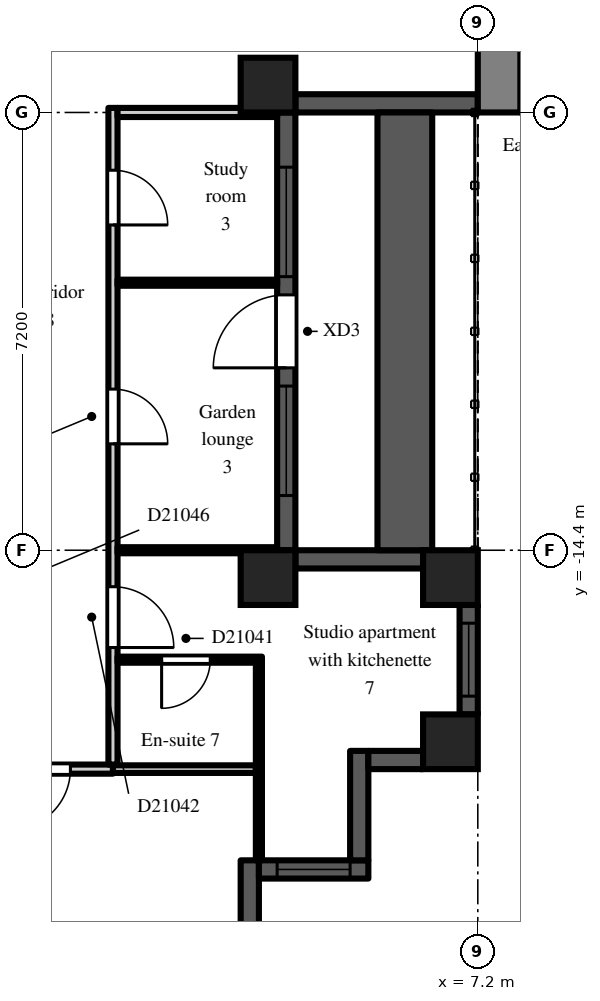
"""IFC4 building model, lengths in metres.
Left out: names, types, materials, properties, quantities, classifications, styles, units other than length and angle.
Written with IfcOpenShell. Run it as: python <this file> out.ifc"""

import sys

from ifc_helpers import new_model, si_unit, direction, frame, frame_2d, origin, origin_2d, place, context, subcontext, project, spatial, rectangle, extrude, element, fill, save


model = new_model("IFC4")
c1 = context("Model", 3, precision=1e-05, world=origin(), true_north=direction((0.0, 1.0)))
c2 = subcontext(c1, "Body", "Model", "MODEL_VIEW")
j1 = project(units=[si_unit("LENGTHUNIT", "METRE"), si_unit("PLANEANGLEUNIT", "RADIAN")], contexts=[c1])
p1 = place(None, origin())
s1 = spatial("IfcSite", under=j1, at=p1, CompositionType="ELEMENT")
p2 = place(p1, origin())
s2 = spatial("IfcBuilding", under=s1, at=p2, CompositionType="ELEMENT")
p3 = place(p2, frame((0.0, 0.0, 147.3)))
s3 = spatial("IfcBuildingStorey", under=s2, at=p3, CompositionType="ELEMENT", Elevation=147.3)
for number, where, z_axis, x_axis in (
    (1, (3.75, -14.85, 0.0), (0.0, 0.0, 1.0), (1.0, 0.0, 0.0)),
    (2, (3.75, -6.75, 0.0), (0.0, 0.0, 1.0), (1.0, 0.0, 0.0)),
    (3, (6.75, -17.55, 0.0), (0.0, 0.0, 1.0), (1.0, 0.0, 0.0)),
    (4, (6.75, -14.85, 0.0), (0.0, 0.0, 1.0), (1.0, 0.0, 0.0)),
):
    element("IfcColumn", number, at=place(p3, frame(where, z_axis=z_axis, x_axis=x_axis)), inside=s3, PredefinedType="COLUMN", context=c2, shape_type="SweptSolid", body=[
        extrude(rectangle(XDim=0.9, YDim=0.9, at=origin_2d()), origin(), (0.0, 0.0, 1.0), 3.0),
    ])
p4 = place(p3, frame((3.45, -20.7, 0.0), z_axis=(0.0, 0.0, 1.0), x_axis=(0.0, 1.0, 0.0)))
e5 = element("IfcWall", 5, at=p4, inside=s3, PredefinedType="SOLIDWALL", context=c2, shape_type="SweptSolid", body=[
    extrude(rectangle(XDim=1.2, YDim=0.3, at=frame_2d((0.6, 0.0))), origin(), (0.0, 0.0, 1.0), 2.6),
])
p5 = place(p3, frame((3.6, -19.65, 0.0), z_axis=(0.0, 0.0, 1.0), x_axis=(1.0, 0.0, 0.0)))
e6 = element("IfcWall", 6, at=p5, inside=s3, PredefinedType="SOLIDWALL", context=c2, shape_type="SweptSolid", body=[
    extrude(rectangle(XDim=1.8, YDim=0.3, at=frame_2d((0.9, 0.0))), origin(), (0.0, 0.0, 1.0), 2.6),
])
p6 = place(p5, frame((0.3, 0.0, 0.2)))
e7 = element("IfcOpeningElement", 7, at=p6, cuts=e6, PredefinedType="OPENING", context=c2, shape_type="SweptSolid", body=[
    extrude(rectangle(XDim=1.2, YDim=1.85, at=frame_2d((0.6, 0.925))), frame((0.0, 0.16, 0.0), z_axis=(0.0, -1.0, 0.0), x_axis=(1.0, 0.0, 0.0)), (0.0, 0.0, 1.0), 0.32),
])
p7 = place(p3, frame((5.25, -19.5, 0.0), z_axis=(0.0, 0.0, 1.0), x_axis=(0.0, 1.0, 0.0)))
e8 = element("IfcWall", 8, at=p7, inside=s3, PredefinedType="SOLIDWALL", context=c2, shape_type="SweptSolid", body=[
    extrude(rectangle(XDim=1.8, YDim=0.3, at=frame_2d((0.9, 0.0))), origin(), (0.0, 0.0, 1.0), 2.6),
])
p8 = place(p3, frame((5.4, -17.85, 0.0), z_axis=(0.0, 0.0, 1.0), x_axis=(1.0, 0.0, 0.0)))
e9 = element("IfcWall", 9, at=p8, inside=s3, PredefinedType="SOLIDWALL", context=c2, shape_type="SweptSolid", body=[
    extrude(rectangle(XDim=0.9, YDim=0.3, at=frame_2d((0.45, 0.0))), origin(), (0.0, 0.0, 1.0), 2.6),
])
p9 = place(p3, frame((7.05, -17.1, 0.0), z_axis=(0.0, 0.0, 1.0), x_axis=(0.0, 1.0, 0.0)))
e10 = element("IfcWall", 10, at=p9, inside=s3, PredefinedType="SOLIDWALL", context=c2, shape_type="SweptSolid", body=[
    extrude(rectangle(XDim=1.8, YDim=0.3, at=frame_2d((0.9, 0.0))), origin(), (0.0, 0.0, 1.0), 2.2),
])
p10 = place(p9, frame((0.3, 0.0, 0.2)))
e11 = element("IfcOpeningElement", 11, at=p10, cuts=e10, PredefinedType="OPENING", context=c2, shape_type="SweptSolid", body=[
    extrude(rectangle(XDim=1.2, YDim=1.85, at=frame_2d((0.6, 0.925))), frame((0.0, 0.16, 0.0), z_axis=(0.0, -1.0, 0.0), x_axis=(1.0, 0.0, 0.0)), (0.0, 0.0, 1.0), 0.32),
])
p11 = place(p3, frame((6.3, -14.55, 0.0), z_axis=(0.0, 0.0, 1.0), x_axis=(-1.0, 0.0, 0.0)))
e12 = element("IfcWall", 12, at=p11, inside=s3, PredefinedType="SOLIDWALL", context=c2, shape_type="SweptSolid", body=[
    extrude(rectangle(XDim=2.1, YDim=0.3, at=frame_2d((1.05, 0.0))), origin(), (0.0, 0.0, 1.0), 2.2),
])
p12 = place(p3, frame((4.05, -14.4, 0.0), z_axis=(0.0, 0.0, 1.0), x_axis=(0.0, 1.0, 0.0)))
e13 = element("IfcWall", 13, at=p12, inside=s3, PredefinedType="SOLIDWALL", context=c2, shape_type="SweptSolid", body=[
    extrude(rectangle(XDim=7.2, YDim=0.3, at=frame_2d((3.6, 0.0))), origin(), (0.0, 0.0, 1.0), 2.2),
])
p13 = place(p12, frame((3.0, 0.0, 0.0)))
e14 = element("IfcOpeningElement", 14, at=p13, cuts=e13, PredefinedType="OPENING", context=c2, shape_type="SweptSolid", body=[
    extrude(rectangle(XDim=1.2, YDim=2.05, at=frame_2d((0.6, 1.025))), frame((0.0, 0.16, 0.0), z_axis=(0.0, -1.0, 0.0), x_axis=(1.0, 0.0, 0.0)), (0.0, 0.0, 1.0), 0.32),
])
p14 = place(p12, frame((0.9, 0.0, 0.2)))
e15 = element("IfcOpeningElement", 15, at=p14, cuts=e13, PredefinedType="OPENING", context=c2, shape_type="SweptSolid", body=[
    extrude(rectangle(XDim=1.8, YDim=1.85, at=frame_2d((0.9, 0.925))), frame((0.0, 0.16, 0.0), z_axis=(0.0, -1.0, 0.0), x_axis=(1.0, 0.0, 0.0)), (0.0, 0.0, 1.0), 0.32),
])
p15 = place(p12, frame((4.5, 0.0, 0.2)))
e16 = element("IfcOpeningElement", 16, at=p15, cuts=e13, PredefinedType="OPENING", context=c2, shape_type="SweptSolid", body=[
    extrude(rectangle(XDim=1.8, YDim=1.85, at=frame_2d((0.9, 0.925))), frame((0.0, 0.16, 0.0), z_axis=(0.0, -1.0, 0.0), x_axis=(1.0, 0.0, 0.0)), (0.0, 0.0, 1.0), 0.32),
])
p16 = place(p3, frame((4.2, -7.05, 0.0), z_axis=(0.0, 0.0, 1.0), x_axis=(1.0, 0.0, 0.0)))
e17 = element("IfcWall", 17, at=p16, inside=s3, PredefinedType="SOLIDWALL", context=c2, shape_type="SweptSolid", body=[
    extrude(rectangle(XDim=3.0, YDim=0.3, at=frame_2d((1.5, 0.0))), origin(), (0.0, 0.0, 1.0), 2.2),
])
p17 = place(p3, frame((6.0, -14.4, 0.0), z_axis=(0.0, 0.0, 1.0), x_axis=(0.0, 1.0, 0.0)))
e18 = element("IfcWall", 18, at=p17, inside=s3, PredefinedType="PARAPET", context=c2, shape_type="SweptSolid", body=[
    extrude(rectangle(XDim=7.2, YDim=0.9, at=frame_2d((3.6, 0.0))), origin(), (0.0, 0.0, 1.0), 0.8),
])
p18 = place(p3, frame((7.55, -7.2, 0.0), z_axis=(0.0, 0.0, 1.0), x_axis=(0.0, 1.0, 0.0)))
e19 = element("IfcWall", 19, at=p18, inside=s3, PredefinedType="SHEAR", context=c2, shape_type="SweptSolid", body=[
    extrude(rectangle(XDim=14.4, YDim=0.7, at=frame_2d((7.2, 0.0))), origin(), (0.0, 0.0, 1.0), 2.6),
])
p19 = place(p18, frame((6.0, 0.0, 0.0)))
e20 = element("IfcOpeningElement", 20, at=p19, cuts=e19, PredefinedType="OPENING", context=c2, shape_type="SweptSolid", body=[
    extrude(rectangle(XDim=2.4, YDim=2.2, at=frame_2d((1.2, 1.1))), frame((0.0, 0.36, 0.0), z_axis=(0.0, -1.0, 0.0), x_axis=(1.0, 0.0, 0.0)), (0.0, 0.0, 1.0), 0.72),
])
p20 = place(p3, frame((-1.2, -18.0, 0.0), z_axis=(0.0, 0.0, 1.0), x_axis=(1.0, 0.0, 0.0)))
e21 = element("IfcWall", 21, at=p20, inside=s3, PredefinedType="PARTITIONING", context=c2, shape_type="SweptSolid", body=[
    extrude(rectangle(XDim=2.4, YDim=0.15, at=frame_2d((1.2, 0.0))), origin(), (0.0, 0.0, 1.0), 2.6),
])
p21 = place(p20, frame((0.7, 0.0, 0.0)))
e22 = element("IfcOpeningElement", 22, at=p21, cuts=e21, PredefinedType="OPENING", context=c2, shape_type="SweptSolid", body=[
    extrude(rectangle(XDim=1.0, YDim=2.1, at=frame_2d((0.5, 1.05))), frame((0.0, 0.085, 0.0), z_axis=(0.0, -1.0, 0.0), x_axis=(1.0, 0.0, 0.0)), (0.0, 0.0, 1.0), 0.17),
])
p22 = place(p3, frame((1.2, -17.925, 0.0), z_axis=(0.0, 0.0, 1.0), x_axis=(0.0, 1.0, 0.0)))
e23 = element("IfcWall", 23, at=p22, inside=s3, PredefinedType="PARTITIONING", context=c2, shape_type="SweptSolid", body=[
    extrude(rectangle(XDim=10.8, YDim=0.15, at=frame_2d((5.4, 0.0))), origin(), (0.0, 0.0, 1.0), 2.6),
])
p23 = place(p22, frame((8.875, 0.0, 0.0)))
e24 = element("IfcOpeningElement", 24, at=p23, cuts=e23, PredefinedType="OPENING", context=c2, shape_type="SweptSolid", body=[
    extrude(rectangle(XDim=0.9, YDim=2.1, at=frame_2d((0.45, 1.05))), frame((0.0, 0.085, 0.0), z_axis=(0.0, -1.0, 0.0), x_axis=(1.0, 0.0, 0.0)), (0.0, 0.0, 1.0), 0.17),
])
p24 = place(p22, frame((5.275, 0.0, 0.0)))
e25 = element("IfcOpeningElement", 25, at=p24, cuts=e23, PredefinedType="OPENING", context=c2, shape_type="SweptSolid", body=[
    extrude(rectangle(XDim=0.9, YDim=2.1, at=frame_2d((0.45, 1.05))), frame((0.0, 0.085, 0.0), z_axis=(0.0, -1.0, 0.0), x_axis=(1.0, 0.0, 0.0)), (0.0, 0.0, 1.0), 0.17),
])
p25 = place(p22, frame((1.925, 0.0, 0.0)))
e26 = element("IfcOpeningElement", 26, at=p25, cuts=e23, PredefinedType="OPENING", context=c2, shape_type="SweptSolid", body=[
    extrude(rectangle(XDim=1.0, YDim=2.1, at=frame_2d((0.5, 1.05))), frame((0.0, 0.085, 0.0), z_axis=(0.0, -1.0, 0.0), x_axis=(1.0, 0.0, 0.0)), (0.0, 0.0, 1.0), 0.17),
])
p26 = place(p3, frame((1.2, -18.0, 0.0), z_axis=(0.0, 0.0, 1.0), x_axis=(1.0, 0.0, 0.0)))
e27 = element("IfcWall", 27, at=p26, inside=s3, PredefinedType="PARTITIONING", context=c2, shape_type="SweptSolid", body=[
    extrude(rectangle(XDim=2.35, YDim=0.125, at=frame_2d((1.175, 0.0))), origin(), (0.0, 0.0, 1.0), 2.6),
])
p27 = place(p3, frame((1.275, -16.2, 0.0), z_axis=(0.0, 0.0, 1.0), x_axis=(1.0, 0.0, 0.0)))
e28 = element("IfcWall", 28, at=p27, inside=s3, PredefinedType="PARTITIONING", context=c2, shape_type="SweptSolid", body=[
    extrude(rectangle(XDim=2.375, YDim=0.1, at=frame_2d((1.188, 0.0))), origin(), (0.0, 0.0, 1.0), 2.6),
])
p28 = place(p27, frame((0.725, 0.0, 0.0)))
e29 = element("IfcOpeningElement", 29, at=p28, cuts=e28, PredefinedType="OPENING", context=c2, shape_type="SweptSolid", body=[
    extrude(rectangle(XDim=0.8, YDim=2.1, at=frame_2d((0.4, 1.05))), frame((0.0, 0.06, 0.0), z_axis=(0.0, -1.0, 0.0), x_axis=(1.0, 0.0, 0.0)), (0.0, 0.0, 1.0), 0.12),
])
for number, where, z_axis, x_axis in (
    (30, (1.275, -14.4, 0.0), (0.0, 0.0, 1.0), (1.0, 0.0, 0.0)),
    (31, (1.275, -10.0, 0.0), (0.0, 0.0, 1.0), (1.0, 0.0, 0.0)),
):
    element("IfcWall", number, at=place(p3, frame(where, z_axis=z_axis, x_axis=x_axis)), inside=s3, PredefinedType="PARTITIONING", context=c2, shape_type="SweptSolid", body=[
        extrude(rectangle(XDim=2.625, YDim=0.1, at=frame_2d((1.312, 0.0))), origin(), (0.0, 0.0, 1.0), 2.6),
    ])
p29 = place(p3, frame((1.275, -7.2, 0.0), z_axis=(0.0, 0.0, 1.0), x_axis=(1.0, 0.0, 0.0)))
e32 = element("IfcWall", 32, at=p29, inside=s3, PredefinedType="PARTITIONING", context=c2, shape_type="SweptSolid", body=[
    extrude(rectangle(XDim=2.625, YDim=0.15, at=frame_2d((1.312, 0.0))), origin(), (0.0, 0.0, 1.0), 2.6),
])
p30 = place(p3, frame((3.6, -19.5, 0.0), z_axis=(0.0, 0.0, 1.0), x_axis=(0.0, 1.0, 0.0)))
e33 = element("IfcWall", 33, at=p30, inside=s3, PredefinedType="PARTITIONING", context=c2, shape_type="SweptSolid", body=[
    extrude(rectangle(XDim=3.25, YDim=0.1, at=frame_2d((1.625, 0.0))), origin(), (0.0, 0.0, 1.0), 2.6),
])
p31 = place(p6, origin())
e34 = element("IfcWindow", 34, at=p31, inside=s3, PartitioningType="SINGLE_PANEL", PredefinedType="WINDOW", context=c2, shape_type="SweptSolid", body=[
    extrude(rectangle(XDim=1.2, YDim=1.85, at=frame_2d((0.6, 0.925))), frame((0.0, 0.03, 0.0), z_axis=(0.0, -1.0, 0.0), x_axis=(1.0, 0.0, 0.0)), (0.0, 0.0, 1.0), 0.06),
])
fill(e7, e34)
p32 = place(p10, origin())
e35 = element("IfcWindow", 35, at=p32, inside=s3, PartitioningType="SINGLE_PANEL", PredefinedType="WINDOW", context=c2, shape_type="SweptSolid", body=[
    extrude(rectangle(XDim=1.2, YDim=1.85, at=frame_2d((0.6, 0.925))), frame((0.0, 0.03, 0.0), z_axis=(0.0, -1.0, 0.0), x_axis=(1.0, 0.0, 0.0)), (0.0, 0.0, 1.0), 0.06),
])
fill(e11, e35)
p33 = place(p13, origin())
e36 = element("IfcDoor", 36, at=p33, inside=s3, OperationType="SINGLE_SWING_LEFT", PredefinedType="DOOR", context=c2, shape_type="SweptSolid", body=[
    extrude(rectangle(XDim=1.2, YDim=2.05, at=frame_2d((0.6, 1.025))), frame((0.0, 0.025, 0.0), z_axis=(0.0, -1.0, 0.0), x_axis=(1.0, 0.0, 0.0)), (0.0, 0.0, 1.0), 0.05),
])
fill(e14, e36)
p34 = place(p14, origin())
e37 = element("IfcWindow", 37, at=p34, inside=s3, PartitioningType="SINGLE_PANEL", PredefinedType="WINDOW", context=c2, shape_type="SweptSolid", body=[
    extrude(rectangle(XDim=1.8, YDim=1.85, at=frame_2d((0.9, 0.925))), frame((0.0, 0.03, 0.0), z_axis=(0.0, -1.0, 0.0), x_axis=(1.0, 0.0, 0.0)), (0.0, 0.0, 1.0), 0.06),
])
fill(e15, e37)
p35 = place(p15, origin())
e38 = element("IfcWindow", 38, at=p35, inside=s3, PartitioningType="SINGLE_PANEL", PredefinedType="WINDOW", context=c2, shape_type="SweptSolid", body=[
    extrude(rectangle(XDim=1.8, YDim=1.85, at=frame_2d((0.9, 0.925))), frame((0.0, 0.03, 0.0), z_axis=(0.0, -1.0, 0.0), x_axis=(1.0, 0.0, 0.0)), (0.0, 0.0, 1.0), 0.06),
])
fill(e16, e38)
p36 = place(p21, frame((1.0, 0.0, 0.0), z_axis=(0.0, 0.0, 1.0), x_axis=(-1.0, 0.0, 0.0)))
e39 = element("IfcDoor", 39, at=p36, inside=s3, OperationType="SINGLE_SWING_RIGHT", PredefinedType="DOOR", context=c2, shape_type="SweptSolid", body=[
    extrude(rectangle(XDim=1.0, YDim=2.1, at=frame_2d((0.5, 1.05))), frame((0.0, 0.025, 0.0), z_axis=(0.0, -1.0, 0.0), x_axis=(1.0, 0.0, 0.0)), (0.0, 0.0, 1.0), 0.05),
])
fill(e22, e39)
p37 = place(p23, frame((0.9, 0.0, 0.0), z_axis=(0.0, 0.0, 1.0), x_axis=(-1.0, 0.0, 0.0)))
e40 = element("IfcDoor", 40, at=p37, inside=s3, OperationType="SINGLE_SWING_RIGHT", PredefinedType="DOOR", context=c2, shape_type="SweptSolid", body=[
    extrude(rectangle(XDim=0.9, YDim=2.1, at=frame_2d((0.45, 1.05))), frame((0.0, 0.025, 0.0), z_axis=(0.0, -1.0, 0.0), x_axis=(1.0, 0.0, 0.0)), (0.0, 0.0, 1.0), 0.05),
])
fill(e24, e40)
p38 = place(p24, frame((0.9, 0.0, 0.0), z_axis=(0.0, 0.0, 1.0), x_axis=(-1.0, 0.0, 0.0)))
e41 = element("IfcDoor", 41, at=p38, inside=s3, OperationType="SINGLE_SWING_RIGHT", PredefinedType="DOOR", context=c2, shape_type="SweptSolid", body=[
    extrude(rectangle(XDim=0.9, YDim=2.1, at=frame_2d((0.45, 1.05))), frame((0.0, 0.025, 0.0), z_axis=(0.0, -1.0, 0.0), x_axis=(1.0, 0.0, 0.0)), (0.0, 0.0, 1.0), 0.05),
])
fill(e25, e41)
p39 = place(p28, frame((0.8, 0.0, 0.0), z_axis=(0.0, 0.0, 1.0), x_axis=(-1.0, 0.0, 0.0)))
e42 = element("IfcDoor", 42, at=p39, inside=s3, OperationType="SINGLE_SWING_RIGHT", PredefinedType="DOOR", context=c2, shape_type="SweptSolid", body=[
    extrude(rectangle(XDim=0.8, YDim=2.1, at=frame_2d((0.4, 1.05))), frame((0.0, 0.025, 0.0), z_axis=(0.0, -1.0, 0.0), x_axis=(1.0, 0.0, 0.0)), (0.0, 0.0, 1.0), 0.05),
])
fill(e29, e42)
p40 = place(p25, frame((1.0, 0.0, 0.0), z_axis=(0.0, 0.0, 1.0), x_axis=(-1.0, 0.0, 0.0)))
e43 = element("IfcDoor", 43, at=p40, inside=s3, OperationType="SINGLE_SWING_RIGHT", PredefinedType="DOOR", context=c2, shape_type="SweptSolid", body=[
    extrude(rectangle(XDim=1.0, YDim=2.1, at=frame_2d((0.5, 1.05))), frame((0.0, 0.025, 0.0), z_axis=(0.0, -1.0, 0.0), x_axis=(1.0, 0.0, 0.0)), (0.0, 0.0, 1.0), 0.05),
])
fill(e26, e43)
save(model, sys.argv[1])
